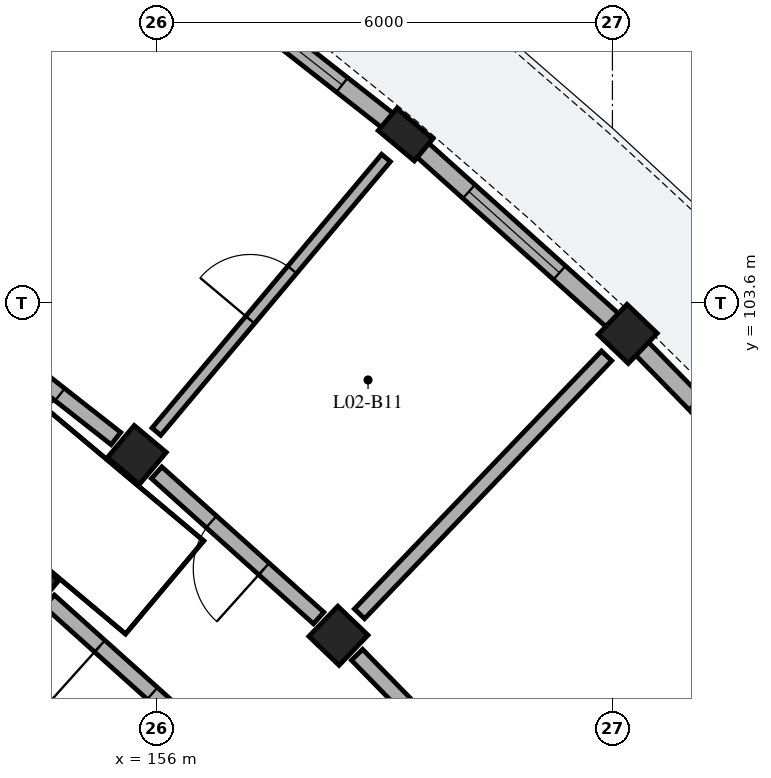
"""IFC4 building model, lengths in metres.
Left out: names, types, materials, properties, quantities, classifications, styles, units other than length and angle.
Written with IfcOpenShell. Run it as: python <this file> out.ifc"""

import sys

from ifc_helpers import new_model, si_unit, direction, frame, frame_2d, origin, origin_2d, place, context, subcontext, project, spatial, rectangle, extrude, element, fill, save


model = new_model("IFC4")
c1 = context("Model", 3, precision=1e-05, world=origin(), true_north=direction((0.0, 1.0)))
c2 = subcontext(c1, "Body", "Model", "MODEL_VIEW")
j1 = project(units=[si_unit("LENGTHUNIT", "METRE"), si_unit("PLANEANGLEUNIT", "RADIAN")], contexts=[c1])
p1 = place(None, origin())
s1 = spatial("IfcSite", under=j1, at=p1, CompositionType="ELEMENT")
p2 = place(p1, origin())
s2 = spatial("IfcBuilding", under=s1, at=p2, CompositionType="ELEMENT")
p3 = place(p2, frame((0.0, 0.0, 8.84)))
s3 = spatial("IfcBuildingStorey", under=s2, at=p3, CompositionType="ELEMENT", Elevation=8.84)
for number, where, z_axis, x_axis in (
    (1, (158.395, 99.226, 0.0), (0.0, 0.0, 1.0), (0.692, 0.722, 0.0)),
    (2, (162.2, 103.197, 0.0), (0.0, 0.0, 1.0), (0.692, 0.722, 0.0)),
    (3, (154.329, 99.919, 0.0), (0.0, 0.0, 1.0), (0.643, 0.766, 0.0)),
    (4, (155.743, 101.605, 0.0), (0.0, 0.0, 1.0), (0.643, 0.766, 0.0)),
):
    element("IfcColumn", number, at=place(p3, frame(where, z_axis=z_axis, x_axis=x_axis)), inside=s3, PredefinedType="COLUMN", context=c2, shape_type="SweptSolid", body=[
        extrude(rectangle(XDim=0.55, YDim=0.55, at=origin_2d()), origin(), (0.0, 0.0, 1.0), 3.105),
    ])
p4 = place(p3, frame((159.278, 105.818, 0.0), z_axis=(0.0, 0.0, 1.0), x_axis=(0.642787582947, 0.766044465556, 0.0)))
e5 = element("IfcColumn", 5, at=p4, inside=s3, PredefinedType="PILASTER", context=c2, shape_type="SweptSolid", body=[
    extrude(rectangle(XDim=0.38, YDim=0.62, at=origin_2d()), origin(), (0.0, 0.0, 1.0), 3.105),
])
p5 = place(p3, frame((164.832, 100.503, 0.0), z_axis=(0.0, 0.0, 1.0), x_axis=(-0.698841852324, 0.715276216186, 0.0)))
e6 = element("IfcWall", 6, at=p5, inside=s3, PredefinedType="SOLIDWALL", context=c2, shape_type="SweptSolid", body=[
    extrude(rectangle(XDim=3.521, YDim=0.24, at=frame_2d((1.76, 0.0))), origin(), (0.0, 0.0, 1.0), 2.355),
])
p6 = place(p5, frame((1.021, 0.0, 0.55)))
e7 = element("IfcOpeningElement", 7, at=p6, cuts=e6, PredefinedType="OPENING", context=c2, shape_type="SweptSolid", body=[
    extrude(rectangle(XDim=1.48, YDim=1.46, at=frame_2d((0.74, 0.73))), frame((0.0, 0.13, 0.0), z_axis=(0.0, -1.0, 0.0), x_axis=(1.0, 0.0, 0.0)), (0.0, 0.0, 1.0), 0.26),
])
p7 = place(p3, frame((162.018, 103.36, 0.0), z_axis=(0.0, 0.0, 1.0), x_axis=(-0.744413726571, 0.667718656092, 0.0)))
e8 = element("IfcWall", 8, at=p7, inside=s3, PredefinedType="SOLIDWALL", context=c2, shape_type="SweptSolid", body=[
    extrude(rectangle(XDim=3.521, YDim=0.24, at=frame_2d((1.76, 0.0))), origin(), (0.0, 0.0, 1.0), 2.355),
])
p8 = place(p7, frame((0.96, 0.0, 0.55)))
e9 = element("IfcOpeningElement", 9, at=p8, cuts=e8, PredefinedType="OPENING", context=c2, shape_type="SweptSolid", body=[
    extrude(rectangle(XDim=1.6, YDim=1.535, at=frame_2d((0.8, 0.768))), frame((0.0, 0.13, 0.0), z_axis=(0.0, -1.0, 0.0), x_axis=(1.0, 0.0, 0.0)), (0.0, 0.0, 1.0), 0.26),
])
p9 = place(p3, frame((159.152, 105.917, 0.0), z_axis=(0.0, 0.0, 1.0), x_axis=(-0.786813798172, 0.617190446301, 0.0)))
e10 = element("IfcWall", 10, at=p9, inside=s3, PredefinedType="SOLIDWALL", context=c2, shape_type="SweptSolid", body=[
    extrude(rectangle(XDim=3.521, YDim=0.24, at=frame_2d((1.76, 0.0))), origin(), (0.0, 0.0, 1.0), 2.355),
])
p10 = place(p9, frame((0.9, 0.0, 0.55)))
e11 = element("IfcOpeningElement", 11, at=p10, cuts=e10, PredefinedType="OPENING", context=c2, shape_type="SweptSolid", body=[
    extrude(rectangle(XDim=1.72, YDim=1.61, at=frame_2d((0.86, 0.805))), frame((0.0, 0.13, 0.0), z_axis=(0.0, -1.0, 0.0), x_axis=(1.0, 0.0, 0.0)), (0.0, 0.0, 1.0), 0.26),
])
p11 = place(p3, frame((160.641, 96.927, 0.0), z_axis=(0.0, 0.0, 1.0), x_axis=(-0.698787219683, 0.715329589496, 0.0)))
e12 = element("IfcWall", 12, at=p11, inside=s3, PredefinedType="PARTITIONING", context=c2, shape_type="SweptSolid", body=[
    extrude(rectangle(XDim=2.863, YDim=0.205, at=frame_2d((1.432, 0.0))), origin(), (0.0, 0.0, 1.0), 2.37),
])
p12 = place(p11, frame((0.957, 0.0, 0.0)))
e13 = element("IfcOpeningElement", 13, at=p12, cuts=e12, PredefinedType="OPENING", context=c2, shape_type="SweptSolid", body=[
    extrude(rectangle(XDim=0.95, YDim=2.13, at=frame_2d((0.475, 1.065))), frame((0.0, 0.113, 0.0), z_axis=(0.0, -1.0, 0.0), x_axis=(1.0, 0.0, 0.0)), (0.0, 0.0, 1.0), 0.225),
])
p13 = place(p3, frame((158.672, 99.514, 0.0), z_axis=(0.0, 0.0, 1.0), x_axis=(0.691855720025, 0.722035776585, 0.0)))
e14 = element("IfcWall", 14, at=p13, inside=s3, PredefinedType="PARTITIONING", context=c2, shape_type="SweptSolid", body=[
    extrude(rectangle(XDim=4.7, YDim=0.185, at=frame_2d((2.35, 0.0))), origin(), (0.0, 0.0, 1.0), 2.37),
])
p14 = place(p3, frame((158.135, 99.459, 0.0), z_axis=(0.0, 0.0, 1.0), x_axis=(-0.744433521088, 0.667696587291, 0.0)))
e15 = element("IfcWall", 15, at=p14, inside=s3, PredefinedType="PARTITIONING", context=c2, shape_type="SweptSolid", body=[
    extrude(rectangle(XDim=2.863, YDim=0.205, at=frame_2d((1.432, 0.0))), origin(), (0.0, 0.0, 1.0), 2.37),
])
p15 = place(p14, frame((0.967, 0.0, 0.0)))
e16 = element("IfcOpeningElement", 16, at=p15, cuts=e15, PredefinedType="OPENING", context=c2, shape_type="SweptSolid", body=[
    extrude(rectangle(XDim=0.93, YDim=2.12, at=frame_2d((0.465, 1.06))), frame((0.0, 0.113, 0.0), z_axis=(0.0, -1.0, 0.0), x_axis=(1.0, 0.0, 0.0)), (0.0, 0.0, 1.0), 0.225),
])
p16 = place(p3, frame((156.613, 97.871, 0.0), z_axis=(0.0, 0.0, 1.0), x_axis=(-0.744418559135, 0.667713268413, 0.0)))
e17 = element("IfcWall", 17, at=p16, inside=s3, PredefinedType="PARTITIONING", context=c2, shape_type="SweptSolid", body=[
    extrude(rectangle(XDim=2.718, YDim=0.205, at=frame_2d((1.359, 0.0))), origin(), (0.0, 0.0, 1.0), 2.37),
])
p17 = place(p16, frame((0.894, 0.0, 0.0)))
e18 = element("IfcOpeningElement", 18, at=p17, cuts=e17, PredefinedType="OPENING", context=c2, shape_type="SweptSolid", body=[
    extrude(rectangle(XDim=0.93, YDim=2.12, at=frame_2d((0.465, 1.06))), frame((0.0, 0.113, 0.0), z_axis=(0.0, -1.0, 0.0), x_axis=(1.0, 0.0, 0.0)), (0.0, 0.0, 1.0), 0.225),
])
p18 = place(p3, frame((156.0, 101.911, 0.0), z_axis=(0.0, 0.0, 1.0), x_axis=(0.642811926223, 0.766024038465, 0.0)))
e19 = element("IfcWall", 19, at=p18, inside=s3, PredefinedType="PLUMBINGWALL", context=c2, shape_type="SweptSolid", body=[
    extrude(rectangle(XDim=4.7, YDim=0.15, at=frame_2d((2.35, 0.0))), origin(), (0.0, 0.0, 1.0), 2.37),
])
p19 = place(p18, frame((1.92, 0.0, 0.0)))
e20 = element("IfcOpeningElement", 20, at=p19, cuts=e19, PredefinedType="OPENING", context=c2, shape_type="SweptSolid", body=[
    extrude(rectangle(XDim=0.86, YDim=2.06, at=frame_2d((0.43, 1.03))), frame((0.0, 0.085, 0.0), z_axis=(0.0, -1.0, 0.0), x_axis=(1.0, 0.0, 0.0)), (0.0, 0.0, 1.0), 0.17),
])
p20 = place(p3, frame((155.467, 101.821, 0.0), z_axis=(0.0, 0.0, 1.0), x_axis=(-0.786806323554, 0.617199975061, 0.0)))
e21 = element("IfcWall", 21, at=p20, inside=s3, PredefinedType="PARTITIONING", context=c2, shape_type="SweptSolid", body=[
    extrude(rectangle(XDim=2.863, YDim=0.205, at=frame_2d((1.432, 0.0))), origin(), (0.0, 0.0, 1.0), 2.37),
])
p21 = place(p20, frame((0.937, 0.0, 0.0)))
e22 = element("IfcOpeningElement", 22, at=p21, cuts=e21, PredefinedType="OPENING", context=c2, shape_type="SweptSolid", body=[
    extrude(rectangle(XDim=0.99, YDim=2.16, at=frame_2d((0.495, 1.08))), frame((0.0, 0.113, 0.0), z_axis=(0.0, -1.0, 0.0), x_axis=(1.0, 0.0, 0.0)), (0.0, 0.0, 1.0), 0.225),
])
p22 = place(p8, origin())
e23 = element("IfcWindow", 23, at=p22, inside=s3, PartitioningType="SINGLE_PANEL", PredefinedType="WINDOW", context=c2, shape_type="SweptSolid", body=[
    extrude(rectangle(XDim=1.6, YDim=1.535, at=frame_2d((0.8, 0.768))), frame((0.0, 0.03, 0.0), z_axis=(0.0, -1.0, 0.0), x_axis=(1.0, 0.0, 0.0)), (0.0, 0.0, 1.0), 0.06),
])
fill(e9, e23)
p23 = place(p10, origin())
e24 = element("IfcWindow", 24, at=p23, inside=s3, PartitioningType="SINGLE_PANEL", PredefinedType="WINDOW", context=c2, shape_type="SweptSolid", body=[
    extrude(rectangle(XDim=1.72, YDim=1.61, at=frame_2d((0.86, 0.805))), frame((0.0, 0.03, 0.0), z_axis=(0.0, -1.0, 0.0), x_axis=(1.0, 0.0, 0.0)), (0.0, 0.0, 1.0), 0.06),
])
fill(e11, e24)
p24 = place(p15, origin())
e25 = element("IfcDoor", 25, at=p24, inside=s3, OperationType="SINGLE_SWING_LEFT", PredefinedType="DOOR", context=c2, shape_type="SweptSolid", body=[
    extrude(rectangle(XDim=0.93, YDim=2.12, at=frame_2d((0.465, 1.06))), frame((0.0, 0.025, 0.0), z_axis=(0.0, -1.0, 0.0), x_axis=(1.0, 0.0, 0.0)), (0.0, 0.0, 1.0), 0.05),
])
fill(e16, e25)
p25 = place(p17, origin())
e26 = element("IfcDoor", 26, at=p25, inside=s3, OperationType="SINGLE_SWING_RIGHT", PredefinedType="DOOR", context=c2, shape_type="SweptSolid", body=[
    extrude(rectangle(XDim=0.93, YDim=2.12, at=frame_2d((0.465, 1.06))), frame((0.0, 0.025, 0.0), z_axis=(0.0, -1.0, 0.0), x_axis=(1.0, 0.0, 0.0)), (0.0, 0.0, 1.0), 0.05),
])
fill(e18, e26)
p26 = place(p19, origin())
e27 = element("IfcDoor", 27, at=p26, inside=s3, OperationType="SINGLE_SWING_LEFT", PredefinedType="DOOR", context=c2, shape_type="SweptSolid", body=[
    extrude(rectangle(XDim=0.86, YDim=2.06, at=frame_2d((0.43, 1.03))), frame((0.0, 0.025, 0.0), z_axis=(0.0, -1.0, 0.0), x_axis=(1.0, 0.0, 0.0)), (0.0, 0.0, 1.0), 0.05),
])
fill(e20, e27)
p27 = place(p21, origin())
e28 = element("IfcDoor", 28, at=p27, inside=s3, OperationType="SINGLE_SWING_RIGHT", PredefinedType="DOOR", context=c2, shape_type="SweptSolid", body=[
    extrude(rectangle(XDim=0.99, YDim=2.16, at=frame_2d((0.495, 1.08))), frame((0.0, 0.025, 0.0), z_axis=(0.0, -1.0, 0.0), x_axis=(1.0, 0.0, 0.0)), (0.0, 0.0, 1.0), 0.05),
])
fill(e22, e28)
save(model, sys.argv[1])
